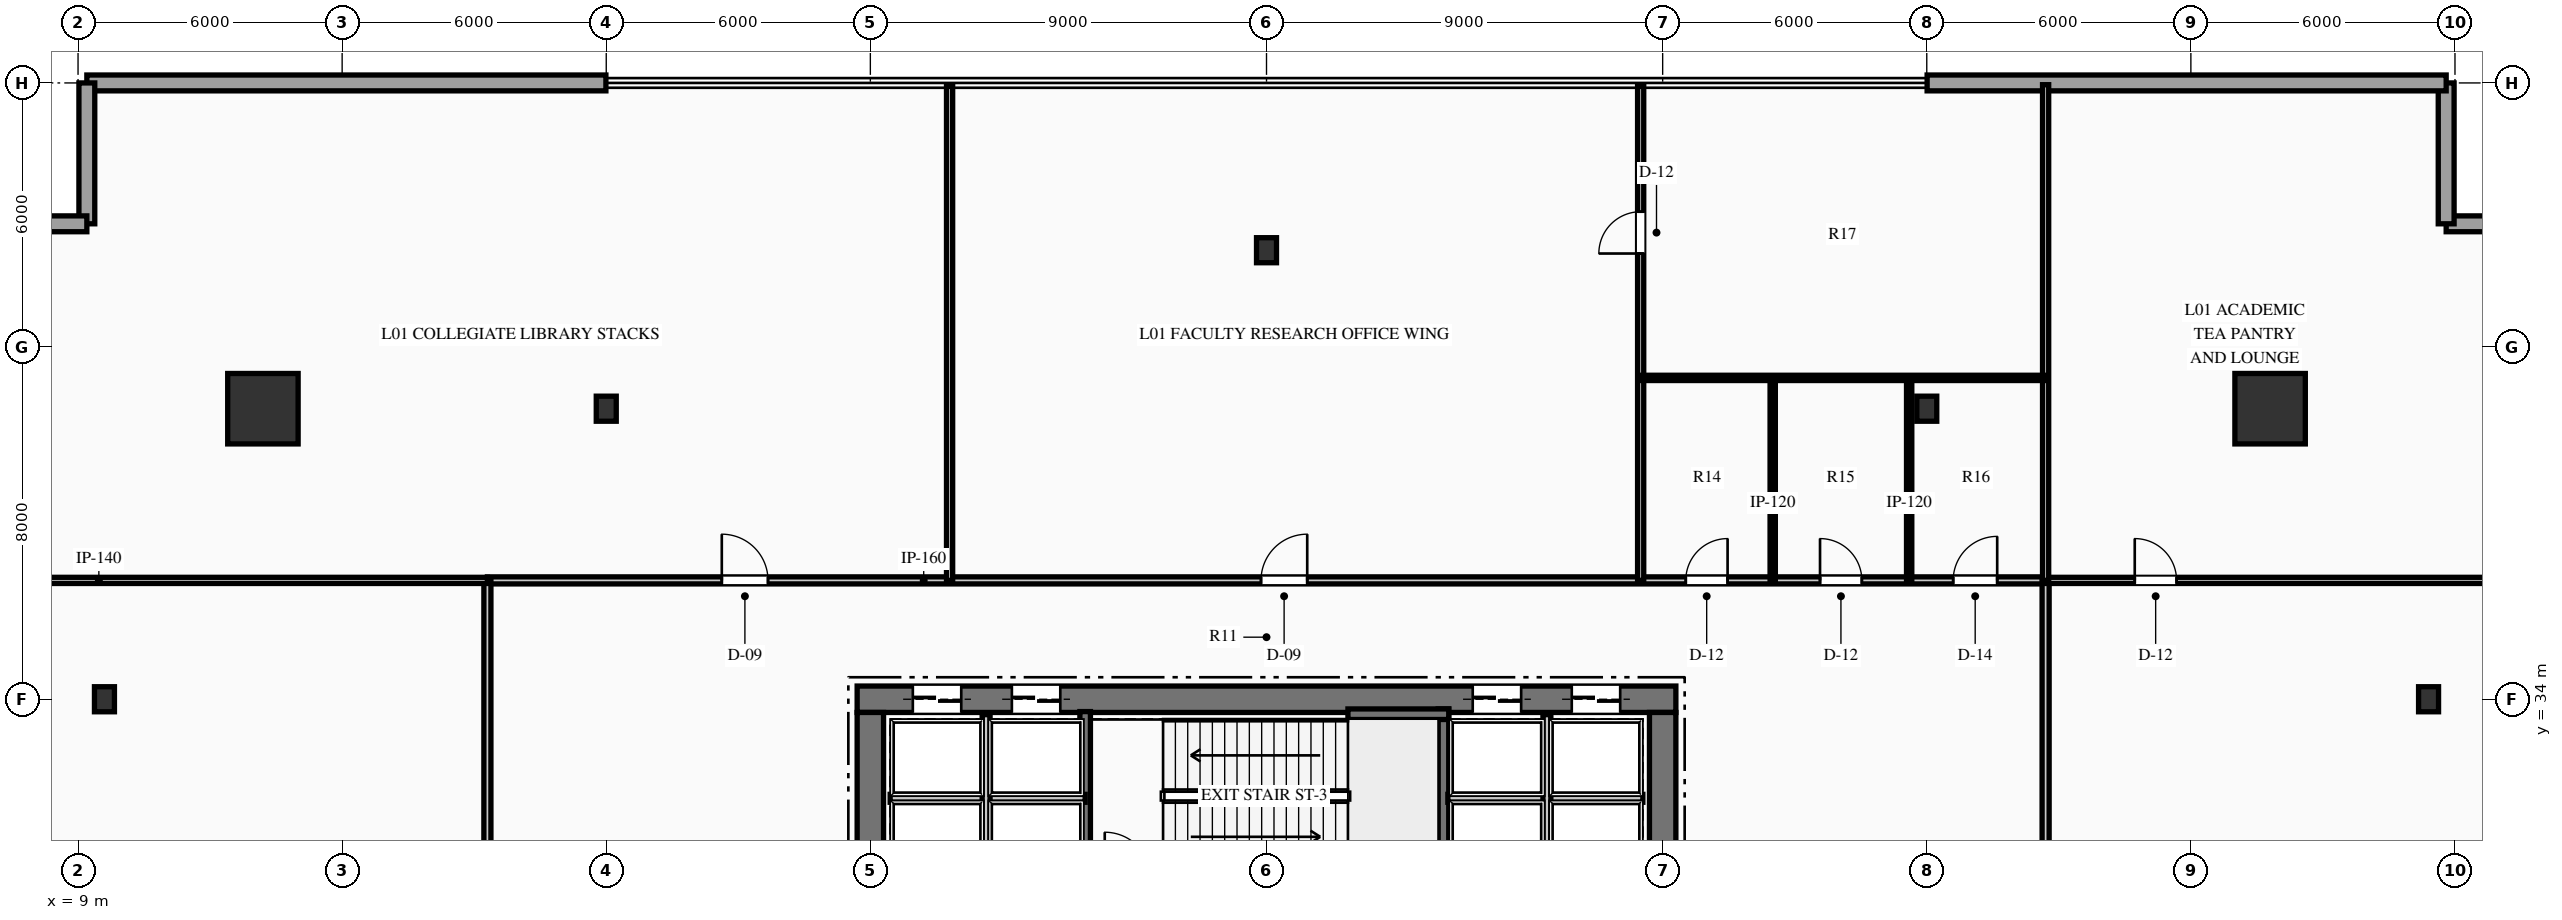
"""IFC4 building model, lengths in metres.
Left out: names, types, materials, properties, quantities, classifications, styles, units other than length and angle.
Written with IfcOpenShell. Run it as: python <this file> out.ifc"""

import sys

from ifc_helpers import new_model, si_unit, direction, frame, frame_2d, origin, origin_2d, place, context, subcontext, project, spatial, rectangle, hollow_rectangle, i_section, extrude, element, fill, save


model = new_model("IFC4")
c1 = context("Model", 3, precision=1e-05, world=origin(), true_north=direction((0.0, 1.0)))
c2 = subcontext(c1, "Body", "Model", "MODEL_VIEW")
j1 = project(units=[si_unit("LENGTHUNIT", "METRE"), si_unit("PLANEANGLEUNIT", "RADIAN")], contexts=[c1])
p1 = place(None, origin())
s1 = spatial("IfcSite", under=j1, at=p1, CompositionType="ELEMENT")
p2 = place(p1, origin())
s2 = spatial("IfcBuilding", under=s1, at=p2, CompositionType="ELEMENT")
p3 = place(p2, frame((0.0, 0.0, 6.0)))
s3 = spatial("IfcBuildingStorey", under=s2, at=p3, CompositionType="ELEMENT", Elevation=6.0)
p4 = place(p3, frame((26.7, 34.0, 0.0), z_axis=(0.0, 0.0, 1.0), x_axis=(1.0, 0.0, 0.0)))
e1 = element("IfcWall", 1, at=p4, inside=s3, PredefinedType="SHEAR", context=c2, shape_type="SweptSolid", body=[
    extrude(rectangle(XDim=18.6, YDim=0.6, at=frame_2d((9.3, 0.0))), origin(), (0.0, 0.0, 1.0), 5.4),
])
p5 = place(p4, frame((1.265, 0.0, 0.0)))
e2 = element("IfcOpeningElement", 2, at=p5, cuts=e1, PredefinedType="OPENING", context=c2, shape_type="SweptSolid", body=[
    extrude(rectangle(XDim=1.1, YDim=2.15, at=frame_2d((0.55, 1.075))), frame((0.0, 0.31, 0.0), z_axis=(0.0, -1.0, 0.0), x_axis=(1.0, 0.0, 0.0)), (0.0, 0.0, 1.0), 0.62),
])
p6 = place(p4, frame((3.515, 0.0, 0.0)))
e3 = element("IfcOpeningElement", 3, at=p6, cuts=e1, PredefinedType="OPENING", context=c2, shape_type="SweptSolid", body=[
    extrude(rectangle(XDim=1.1, YDim=2.15, at=frame_2d((0.55, 1.075))), frame((0.0, 0.31, 0.0), z_axis=(0.0, -1.0, 0.0), x_axis=(1.0, 0.0, 0.0)), (0.0, 0.0, 1.0), 0.62),
])
p7 = place(p4, frame((13.985, 0.0, 0.0)))
e4 = element("IfcOpeningElement", 4, at=p7, cuts=e1, PredefinedType="OPENING", context=c2, shape_type="SweptSolid", body=[
    extrude(rectangle(XDim=1.1, YDim=2.15, at=frame_2d((0.55, 1.075))), frame((0.0, 0.31, 0.0), z_axis=(0.0, -1.0, 0.0), x_axis=(1.0, 0.0, 0.0)), (0.0, 0.0, 1.0), 0.62),
])
p8 = place(p4, frame((16.235, 0.0, 0.0)))
e5 = element("IfcOpeningElement", 5, at=p8, cuts=e1, PredefinedType="OPENING", context=c2, shape_type="SweptSolid", body=[
    extrude(rectangle(XDim=1.1, YDim=2.15, at=frame_2d((0.55, 1.075))), frame((0.0, 0.31, 0.0), z_axis=(0.0, -1.0, 0.0), x_axis=(1.0, 0.0, 0.0)), (0.0, 0.0, 1.0), 0.62),
])
p9 = place(p3, frame((27.0, 18.3, 0.0), z_axis=(0.0, 0.0, 1.0), x_axis=(0.0, 1.0, 0.0)))
e6 = element("IfcWall", 6, at=p9, inside=s3, PredefinedType="SHEAR", context=c2, shape_type="SweptSolid", body=[
    extrude(rectangle(XDim=15.4, YDim=0.6, at=frame_2d((7.7, 0.0))), origin(), (0.0, 0.0, 1.0), 5.4),
])
p10 = place(p9, frame((9.94, 0.0, 0.0)))
e7 = element("IfcOpeningElement", 7, at=p10, cuts=e6, PredefinedType="OPENING", context=c2, shape_type="SweptSolid", body=[
    extrude(rectangle(XDim=1.4, YDim=2.2, at=frame_2d((0.7, 1.1))), frame((0.0, 0.31, 0.0), z_axis=(0.0, -1.0, 0.0), x_axis=(1.0, 0.0, 0.0)), (0.0, 0.0, 1.0), 0.62),
])
p11 = place(p3, frame((45.0, 18.3, 0.0), z_axis=(0.0, 0.0, 1.0), x_axis=(0.0, 1.0, 0.0)))
e8 = element("IfcWall", 8, at=p11, inside=s3, PredefinedType="SHEAR", context=c2, shape_type="SweptSolid", body=[
    extrude(rectangle(XDim=15.4, YDim=0.6, at=frame_2d((7.7, 0.0))), origin(), (0.0, 0.0, 1.0), 5.4),
])
p12 = place(p11, frame((9.94, 0.0, 0.0)))
e9 = element("IfcOpeningElement", 9, at=p12, cuts=e8, PredefinedType="OPENING", context=c2, shape_type="SweptSolid", body=[
    extrude(rectangle(XDim=1.4, YDim=2.2, at=frame_2d((0.7, 1.1))), frame((0.0, 0.31, 0.0), z_axis=(0.0, -1.0, 0.0), x_axis=(1.0, 0.0, 0.0)), (0.0, 0.0, 1.0), 0.62),
])
p13 = place(p3, frame((31.88, 29.93, 0.0), z_axis=(0.0, 0.0, 1.0), x_axis=(0.0, 1.0, 0.0)))
e10 = element("IfcWall", 10, at=p13, inside=s3, PredefinedType="SHEAR", context=c2, shape_type="SweptSolid", body=[
    extrude(rectangle(XDim=3.79, YDim=0.24, at=frame_2d((1.895, 0.0))), origin(), (0.0, 0.0, 1.0), 5.4),
])
p14 = place(p3, frame((40.02, 29.93, 0.0), z_axis=(0.0, 0.0, 1.0), x_axis=(0.0, 1.0, 0.0)))
e11 = element("IfcWall", 11, at=p14, inside=s3, PredefinedType="SHEAR", context=c2, shape_type="SweptSolid", body=[
    extrude(rectangle(XDim=3.85, YDim=0.24, at=frame_2d((1.925, 0.0))), origin(), (0.0, 0.0, 1.0), 5.4),
])
p15 = place(p3, frame((37.85, 33.66, 0.0), z_axis=(0.0, 0.0, 1.0), x_axis=(1.0, 0.0, 0.0)))
e12 = element("IfcWall", 12, at=p15, inside=s3, PredefinedType="SHEAR", context=c2, shape_type="SweptSolid", body=[
    extrude(rectangle(XDim=2.29, YDim=0.24, at=frame_2d((1.145, 0.0))), origin(), (0.0, 0.0, 1.0), 5.4),
])
for number, where, z_axis, x_axis in (
    (13, (58.8, 40.6, 0.0), (0.0, 0.0, 1.0), (1.0, 0.0, 0.0)),
    (14, (13.2, 40.6, 0.0), (0.0, 0.0, 1.0), (1.0, 0.0, 0.0)),
):
    element("IfcColumn", number, at=place(p3, frame(where, z_axis=z_axis, x_axis=x_axis)), inside=s3, PredefinedType="COLUMN", context=c2, shape_type="SweptSolid", body=[
        extrude(hollow_rectangle(XDim=1.6, YDim=1.6, WallThickness=0.08, at=origin_2d()), origin(), (0.0, 0.0, 1.0), 5.4),
    ])
for number, where, z_axis, x_axis in (
    (15, (9.6, 34.0, 0.0), (0.0, 0.0, 1.0), (1.0, 0.0, 0.0)),
    (16, (62.4, 34.0, 0.0), (0.0, 0.0, 1.0), (1.0, 0.0, 0.0)),
    (17, (21.0, 40.6, 0.0), (0.0, 0.0, 1.0), (1.0, 0.0, 0.0)),
    (18, (51.0, 40.6, 0.0), (0.0, 0.0, 1.0), (1.0, 0.0, 0.0)),
    (19, (36.0, 44.2, 0.0), (0.0, 0.0, 1.0), (1.0, 0.0, 0.0)),
):
    element("IfcColumn", number, at=place(p3, frame(where, z_axis=z_axis, x_axis=x_axis)), inside=s3, PredefinedType="COLUMN", context=c2, shape_type="SweptSolid", body=[
        extrude(i_section(OverallWidth=0.454, OverallDepth=0.569, WebThickness=0.078, FlangeThickness=0.125, at=origin_2d()), origin(), (0.0, 0.0, 1.0), 5.4),
    ])
for number, where, z_axis, x_axis in (
    (20, (62.8, 44.8, 0.0), (0.0, 0.0, 1.0), (1.0, 0.0, 0.0)),
    (21, (62.8, 48.0, 0.0), (0.0, 0.0, 1.0), (0.0, -1.0, 0.0)),
):
    element("IfcWall", number, at=place(p3, frame(where, z_axis=z_axis, x_axis=x_axis)), inside=s3, PredefinedType="STANDARD", context=c2, shape_type="SweptSolid", body=[
        extrude(rectangle(XDim=3.2, YDim=0.36, at=frame_2d((1.6, 0.0))), origin(), (0.0, 0.0, 1.0), 5.07),
    ])
for number, where, z_axis, x_axis in (
    (22, (9.2, 48.0, 0.0), (0.0, 0.0, 1.0), (1.0, 0.0, 0.0)),
    (23, (51.008, 48.0, 0.0), (0.0, 0.0, 1.0), (1.0, 0.0, 0.0)),
):
    element("IfcWall", number, at=place(p3, frame(where, z_axis=z_axis, x_axis=x_axis)), inside=s3, PredefinedType="STANDARD", context=c2, shape_type="SweptSolid", body=[
        extrude(rectangle(XDim=11.792, YDim=0.36, at=frame_2d((5.896, 0.0))), origin(), (0.0, 0.0, 1.0), 5.07),
    ])
for number, where, z_axis, x_axis in (
    (24, (9.2, 44.8, 0.0), (0.0, 0.0, 1.0), (0.0, 1.0, 0.0)),
    (25, (6.0, 44.8, 0.0), (0.0, 0.0, 1.0), (1.0, 0.0, 0.0)),
):
    element("IfcWall", number, at=place(p3, frame(where, z_axis=z_axis, x_axis=x_axis)), inside=s3, PredefinedType="STANDARD", context=c2, shape_type="SweptSolid", body=[
        extrude(rectangle(XDim=3.2, YDim=0.36, at=frame_2d((1.6, 0.0))), origin(), (0.0, 0.0, 1.0), 5.07),
    ])
p16 = place(p3, frame((27.45, 31.75, 0.0), z_axis=(0.0, 0.0, 1.0), x_axis=(1.0, 0.0, 0.0)))
e26 = element("IfcWall", 26, at=p16, inside=s3, PredefinedType="PARTITIONING", context=c2, shape_type="SweptSolid", body=[
    extrude(rectangle(XDim=4.43, YDim=0.18, at=frame_2d((2.215, 0.0))), origin(), (0.0, 0.0, 1.0), 5.07),
])
p17 = place(p3, frame((29.63, 29.9, 0.0), z_axis=(0.0, 0.0, 1.0), x_axis=(0.0, 1.0, 0.0)))
e27 = element("IfcWall", 27, at=p17, inside=s3, PredefinedType="PARTITIONING", context=c2, shape_type="SweptSolid", body=[
    extrude(rectangle(XDim=3.75, YDim=0.18, at=frame_2d((1.875, 0.0))), origin(), (0.0, 0.0, 1.0), 5.07),
])
p18 = place(p3, frame((40.12, 31.75, 0.0), z_axis=(0.0, 0.0, 1.0), x_axis=(1.0, 0.0, 0.0)))
e28 = element("IfcWall", 28, at=p18, inside=s3, PredefinedType="PARTITIONING", context=c2, shape_type="SweptSolid", body=[
    extrude(rectangle(XDim=4.43, YDim=0.18, at=frame_2d((2.215, 0.0))), origin(), (0.0, 0.0, 1.0), 5.07),
])
p19 = place(p3, frame((42.37, 29.9, 0.0), z_axis=(0.0, 0.0, 1.0), x_axis=(0.0, 1.0, 0.0)))
e29 = element("IfcWall", 29, at=p19, inside=s3, PredefinedType="PARTITIONING", context=c2, shape_type="SweptSolid", body=[
    extrude(rectangle(XDim=3.75, YDim=0.18, at=frame_2d((1.875, 0.0))), origin(), (0.0, 0.0, 1.0), 5.07),
])
p20 = place(p3, frame((18.3, 36.7, 0.0), z_axis=(0.0, 0.0, 1.0), x_axis=(1.0, 0.0, 0.0)))
e30 = element("IfcWall", 30, at=p20, inside=s3, PredefinedType="PARTITIONING", context=c2, shape_type="SweptSolid", body=[
    extrude(rectangle(XDim=35.4, YDim=0.16, at=frame_2d((17.7, 0.0))), origin(), (0.0, 0.0, 1.0), 5.07),
])
p21 = place(p20, frame((5.325, 0.0, 0.0)))
e31 = element("IfcOpeningElement", 31, at=p21, cuts=e30, PredefinedType="OPENING", context=c2, shape_type="SweptSolid", body=[
    extrude(rectangle(XDim=1.05, YDim=2.15, at=frame_2d((0.525, 1.075))), frame((0.0, 0.09, 0.0), z_axis=(0.0, -1.0, 0.0), x_axis=(1.0, 0.0, 0.0)), (0.0, 0.0, 1.0), 0.18),
])
p22 = place(p20, frame((17.575, 0.0, 0.0)))
e32 = element("IfcOpeningElement", 32, at=p22, cuts=e30, PredefinedType="OPENING", context=c2, shape_type="SweptSolid", body=[
    extrude(rectangle(XDim=1.05, YDim=2.15, at=frame_2d((0.525, 1.075))), frame((0.0, 0.09, 0.0), z_axis=(0.0, -1.0, 0.0), x_axis=(1.0, 0.0, 0.0)), (0.0, 0.0, 1.0), 0.18),
])
p23 = place(p20, frame((27.225, 0.0, 0.0)))
e33 = element("IfcOpeningElement", 33, at=p23, cuts=e30, PredefinedType="OPENING", context=c2, shape_type="SweptSolid", body=[
    extrude(rectangle(XDim=0.95, YDim=2.15, at=frame_2d((0.475, 1.075))), frame((0.0, 0.09, 0.0), z_axis=(0.0, -1.0, 0.0), x_axis=(1.0, 0.0, 0.0)), (0.0, 0.0, 1.0), 0.18),
])
p24 = place(p20, frame((30.275, 0.0, 0.0)))
e34 = element("IfcOpeningElement", 34, at=p24, cuts=e30, PredefinedType="OPENING", context=c2, shape_type="SweptSolid", body=[
    extrude(rectangle(XDim=0.95, YDim=2.15, at=frame_2d((0.475, 1.075))), frame((0.0, 0.09, 0.0), z_axis=(0.0, -1.0, 0.0), x_axis=(1.0, 0.0, 0.0)), (0.0, 0.0, 1.0), 0.18),
])
p25 = place(p20, frame((33.3, 0.0, 0.0)))
e35 = element("IfcOpeningElement", 35, at=p25, cuts=e30, PredefinedType="OPENING", context=c2, shape_type="SweptSolid", body=[
    extrude(rectangle(XDim=1.0, YDim=2.15, at=frame_2d((0.5, 1.075))), frame((0.0, 0.09, 0.0), z_axis=(0.0, -1.0, 0.0), x_axis=(1.0, 0.0, 0.0)), (0.0, 0.0, 1.0), 0.18),
])
for number, where, z_axis, x_axis in (
    (36, (18.3, 30.15, 0.0), (0.0, 0.0, 1.0), (0.0, 1.0, 0.0)),
    (37, (53.7, 30.15, 0.0), (0.0, 0.0, 1.0), (0.0, 1.0, 0.0)),
):
    element("IfcWall", number, at=place(p3, frame(where, z_axis=z_axis, x_axis=x_axis)), inside=s3, PredefinedType="PARTITIONING", context=c2, shape_type="SweptSolid", body=[
        extrude(rectangle(XDim=6.55, YDim=0.16, at=frame_2d((3.275, 0.0))), origin(), (0.0, 0.0, 1.0), 5.07),
    ])
p26 = place(p3, frame((6.04, 36.7, 0.0), z_axis=(0.0, 0.0, 1.0), x_axis=(1.0, 0.0, 0.0)))
e38 = element("IfcWall", 38, at=p26, inside=s3, PredefinedType="PARTITIONING", context=c2, shape_type="SweptSolid", body=[
    extrude(rectangle(XDim=12.26, YDim=0.14, at=frame_2d((6.13, 0.0))), origin(), (0.0, 0.0, 1.0), 5.07),
])
p27 = place(p3, frame((53.7, 36.7, 0.0), z_axis=(0.0, 0.0, 1.0), x_axis=(1.0, 0.0, 0.0)))
e39 = element("IfcWall", 39, at=p27, inside=s3, PredefinedType="PARTITIONING", context=c2, shape_type="SweptSolid", body=[
    extrude(rectangle(XDim=12.26, YDim=0.14, at=frame_2d((6.13, 0.0))), origin(), (0.0, 0.0, 1.0), 5.07),
])
p28 = place(p27, frame((2.025, 0.0, 0.0)))
e40 = element("IfcOpeningElement", 40, at=p28, cuts=e39, PredefinedType="OPENING", context=c2, shape_type="SweptSolid", body=[
    extrude(rectangle(XDim=0.95, YDim=2.15, at=frame_2d((0.475, 1.075))), frame((0.0, 0.08, 0.0), z_axis=(0.0, -1.0, 0.0), x_axis=(1.0, 0.0, 0.0)), (0.0, 0.0, 1.0), 0.16),
])
p29 = place(p3, frame((28.8, 36.7, 0.0), z_axis=(0.0, 0.0, 1.0), x_axis=(0.0, 1.0, 0.0)))
e41 = element("IfcWall", 41, at=p29, inside=s3, PredefinedType="PARTITIONING", context=c2, shape_type="SweptSolid", body=[
    extrude(rectangle(XDim=11.26, YDim=0.14, at=frame_2d((5.63, 0.0))), origin(), (0.0, 0.0, 1.0), 5.07),
])
p30 = place(p3, frame((44.5, 36.7, 0.0), z_axis=(0.0, 0.0, 1.0), x_axis=(0.0, 1.0, 0.0)))
e42 = element("IfcWall", 42, at=p30, inside=s3, PredefinedType="PARTITIONING", context=c2, shape_type="SweptSolid", body=[
    extrude(rectangle(XDim=11.26, YDim=0.14, at=frame_2d((5.63, 0.0))), origin(), (0.0, 0.0, 1.0), 5.07),
])
p31 = place(p30, frame((7.425, 0.0, 0.0)))
e43 = element("IfcOpeningElement", 43, at=p31, cuts=e42, PredefinedType="OPENING", context=c2, shape_type="SweptSolid", body=[
    extrude(rectangle(XDim=0.95, YDim=2.15, at=frame_2d((0.475, 1.075))), frame((0.0, 0.08, 0.0), z_axis=(0.0, -1.0, 0.0), x_axis=(1.0, 0.0, 0.0)), (0.0, 0.0, 1.0), 0.16),
])
p32 = place(p3, frame((53.7, 36.7, 0.0), z_axis=(0.0, 0.0, 1.0), x_axis=(0.0, 1.0, 0.0)))
e44 = element("IfcWall", 44, at=p32, inside=s3, PredefinedType="PARTITIONING", context=c2, shape_type="SweptSolid", body=[
    extrude(rectangle(XDim=11.26, YDim=0.14, at=frame_2d((5.63, 0.0))), origin(), (0.0, 0.0, 1.0), 5.07),
])
for number, where, z_axis, x_axis in (
    (45, (47.5, 36.7, 0.0), (0.0, 0.0, 1.0), (0.0, 1.0, 0.0)),
    (46, (50.6, 36.7, 0.0), (0.0, 0.0, 1.0), (0.0, 1.0, 0.0)),
):
    element("IfcWall", number, at=place(p3, frame(where, z_axis=z_axis, x_axis=x_axis)), inside=s3, PredefinedType="PARTITIONING", context=c2, shape_type="SweptSolid", body=[
        extrude(rectangle(XDim=4.6, YDim=0.12, at=frame_2d((2.3, 0.0))), origin(), (0.0, 0.0, 1.0), 5.07),
    ])
p33 = place(p3, frame((44.5, 41.3, 0.0), z_axis=(0.0, 0.0, 1.0), x_axis=(1.0, 0.0, 0.0)))
e47 = element("IfcWall", 47, at=p33, inside=s3, PredefinedType="PARTITIONING", context=c2, shape_type="SweptSolid", body=[
    extrude(rectangle(XDim=9.2, YDim=0.12, at=frame_2d((4.6, 0.0))), origin(), (0.0, 0.0, 1.0), 4.292),
])
p34 = place(p21, origin())
e48 = element("IfcDoor", 48, at=p34, inside=s3, OperationType="SINGLE_SWING_LEFT", PredefinedType="DOOR", context=c2, shape_type="SweptSolid", body=[
    extrude(rectangle(XDim=1.05, YDim=2.15, at=frame_2d((0.525, 1.075))), frame((0.0, 0.025, 0.0), z_axis=(0.0, -1.0, 0.0), x_axis=(1.0, 0.0, 0.0)), (0.0, 0.0, 1.0), 0.05),
])
fill(e31, e48)
p35 = place(p22, origin())
e49 = element("IfcDoor", 49, at=p35, inside=s3, OperationType="SINGLE_SWING_RIGHT", PredefinedType="DOOR", context=c2, shape_type="SweptSolid", body=[
    extrude(rectangle(XDim=1.05, YDim=2.15, at=frame_2d((0.525, 1.075))), frame((0.0, 0.025, 0.0), z_axis=(0.0, -1.0, 0.0), x_axis=(1.0, 0.0, 0.0)), (0.0, 0.0, 1.0), 0.05),
])
fill(e32, e49)
p36 = place(p31, origin())
e50 = element("IfcDoor", 50, at=p36, inside=s3, OperationType="SINGLE_SWING_LEFT", PredefinedType="DOOR", context=c2, shape_type="SweptSolid", body=[
    extrude(rectangle(XDim=0.95, YDim=2.15, at=frame_2d((0.475, 1.075))), frame((0.0, 0.025, 0.0), z_axis=(0.0, -1.0, 0.0), x_axis=(1.0, 0.0, 0.0)), (0.0, 0.0, 1.0), 0.05),
])
fill(e43, e50)
p37 = place(p23, origin())
e51 = element("IfcDoor", 51, at=p37, inside=s3, OperationType="SINGLE_SWING_RIGHT", PredefinedType="DOOR", context=c2, shape_type="SweptSolid", body=[
    extrude(rectangle(XDim=0.95, YDim=2.15, at=frame_2d((0.475, 1.075))), frame((0.0, 0.025, 0.0), z_axis=(0.0, -1.0, 0.0), x_axis=(1.0, 0.0, 0.0)), (0.0, 0.0, 1.0), 0.05),
])
fill(e33, e51)
p38 = place(p24, origin())
e52 = element("IfcDoor", 52, at=p38, inside=s3, OperationType="SINGLE_SWING_LEFT", PredefinedType="DOOR", context=c2, shape_type="SweptSolid", body=[
    extrude(rectangle(XDim=0.95, YDim=2.15, at=frame_2d((0.475, 1.075))), frame((0.0, 0.025, 0.0), z_axis=(0.0, -1.0, 0.0), x_axis=(1.0, 0.0, 0.0)), (0.0, 0.0, 1.0), 0.05),
])
fill(e34, e52)
p39 = place(p25, origin())
e53 = element("IfcDoor", 53, at=p39, inside=s3, OperationType="SINGLE_SWING_RIGHT", PredefinedType="DOOR", context=c2, shape_type="SweptSolid", body=[
    extrude(rectangle(XDim=1.0, YDim=2.15, at=frame_2d((0.5, 1.075))), frame((0.0, 0.025, 0.0), z_axis=(0.0, -1.0, 0.0), x_axis=(1.0, 0.0, 0.0)), (0.0, 0.0, 1.0), 0.05),
])
fill(e35, e53)
p40 = place(p28, origin())
e54 = element("IfcDoor", 54, at=p40, inside=s3, OperationType="SINGLE_SWING_LEFT", PredefinedType="DOOR", context=c2, shape_type="SweptSolid", body=[
    extrude(rectangle(XDim=0.95, YDim=2.15, at=frame_2d((0.475, 1.075))), frame((0.0, 0.025, 0.0), z_axis=(0.0, -1.0, 0.0), x_axis=(1.0, 0.0, 0.0)), (0.0, 0.0, 1.0), 0.05),
])
fill(e40, e54)
p41 = place(p5, origin())
e55 = element("IfcDoor", 55, at=p41, inside=s3, OperationType="SLIDING_TO_LEFT", PredefinedType="DOOR", context=c2, shape_type="SweptSolid", body=[
    extrude(rectangle(XDim=1.1, YDim=2.15, at=frame_2d((0.55, 1.075))), frame((0.0, 0.025, 0.0), z_axis=(0.0, -1.0, 0.0), x_axis=(1.0, 0.0, 0.0)), (0.0, 0.0, 1.0), 0.05),
])
fill(e2, e55)
p42 = place(p6, origin())
e56 = element("IfcDoor", 56, at=p42, inside=s3, OperationType="SLIDING_TO_LEFT", PredefinedType="DOOR", context=c2, shape_type="SweptSolid", body=[
    extrude(rectangle(XDim=1.1, YDim=2.15, at=frame_2d((0.55, 1.075))), frame((0.0, 0.025, 0.0), z_axis=(0.0, -1.0, 0.0), x_axis=(1.0, 0.0, 0.0)), (0.0, 0.0, 1.0), 0.05),
])
fill(e3, e56)
p43 = place(p7, origin())
e57 = element("IfcDoor", 57, at=p43, inside=s3, OperationType="SLIDING_TO_LEFT", PredefinedType="DOOR", context=c2, shape_type="SweptSolid", body=[
    extrude(rectangle(XDim=1.1, YDim=2.15, at=frame_2d((0.55, 1.075))), frame((0.0, 0.025, 0.0), z_axis=(0.0, -1.0, 0.0), x_axis=(1.0, 0.0, 0.0)), (0.0, 0.0, 1.0), 0.05),
])
fill(e4, e57)
p44 = place(p8, origin())
e58 = element("IfcDoor", 58, at=p44, inside=s3, OperationType="SLIDING_TO_LEFT", PredefinedType="DOOR", context=c2, shape_type="SweptSolid", body=[
    extrude(rectangle(XDim=1.1, YDim=2.15, at=frame_2d((0.55, 1.075))), frame((0.0, 0.025, 0.0), z_axis=(0.0, -1.0, 0.0), x_axis=(1.0, 0.0, 0.0)), (0.0, 0.0, 1.0), 0.05),
])
fill(e5, e58)
save(model, sys.argv[1])
